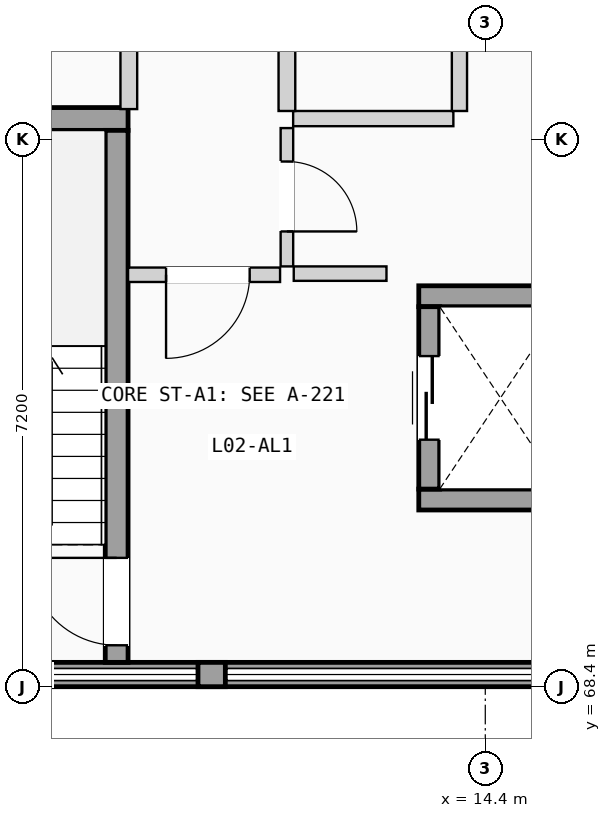
"""IFC4 building model, lengths in metres.
Left out: names, types, materials, properties, quantities, classifications, styles, units other than length and angle.
Written with IfcOpenShell. Run it as: python <this file> out.ifc"""

import sys

from ifc_helpers import new_model, si_unit, direction, frame, frame_2d, origin, place, context, subcontext, project, spatial, rectangle, extrude, element, fill, save


model = new_model("IFC4")
c1 = context("Model", 3, precision=1e-05, world=origin(), true_north=direction((0.0, 1.0)))
c2 = subcontext(c1, "Body", "Model", "MODEL_VIEW")
j1 = project(units=[si_unit("LENGTHUNIT", "METRE"), si_unit("PLANEANGLEUNIT", "RADIAN")], contexts=[c1])
p1 = place(None, origin())
s1 = spatial("IfcSite", under=j1, at=p1, CompositionType="ELEMENT")
p2 = place(p1, origin())
s2 = spatial("IfcBuilding", under=s1, at=p2, CompositionType="ELEMENT")
p3 = place(p2, frame((0.0, 0.0, 8.575)))
s3 = spatial("IfcBuildingStorey", under=s2, at=p3, CompositionType="ELEMENT", Elevation=8.575)
p4 = place(p3, frame((0.0, 68.56, 0.0), z_axis=(0.0, 0.0, 1.0), x_axis=(1.0, 0.0, 0.0)))
e1 = element("IfcWall", 1, at=p4, inside=s3, PredefinedType="SOLIDWALL", context=c2, shape_type="SweptSolid", body=[
    extrude(rectangle(XDim=21.6, YDim=0.32, at=frame_2d((10.8, 0.0))), origin(), (0.0, 0.0, 1.0), 1.11),
])
p5 = place(p3, frame((10.62, 68.56, 1.11), z_axis=(0.0, 0.0, 1.0), x_axis=(1.0, 0.0, 0.0)))
e2 = element("IfcWall", 2, at=p5, inside=s3, PredefinedType="SOLIDWALL", context=c2, shape_type="SweptSolid", body=[
    extrude(rectangle(XDim=0.36, YDim=0.32, at=frame_2d((0.18, 0.0))), origin(), (0.0, 0.0, 1.0), 2.13),
])
p6 = place(p3, frame((5.75, 75.87, 0.0), z_axis=(0.0, 0.0, 1.0), x_axis=(1.0, 0.0, 0.0)))
e3 = element("IfcWall", 3, at=p6, inside=s3, PredefinedType="SHEAR", context=c2, shape_type="SweptSolid", body=[
    extrude(rectangle(XDim=3.95, YDim=0.3, at=frame_2d((1.975, 0.0))), origin(), (0.0, 0.0, 1.0), 3.24),
])
p7 = place(p3, frame((9.55, 68.72, 0.0), z_axis=(0.0, 0.0, 1.0), x_axis=(0.0, 1.0, 0.0)))
e4 = element("IfcWall", 4, at=p7, inside=s3, PredefinedType="SHEAR", context=c2, shape_type="SweptSolid", body=[
    extrude(rectangle(XDim=7.0, YDim=0.3, at=frame_2d((3.5, 0.0))), origin(), (0.0, 0.0, 1.0), 3.24),
])
p8 = place(p7, frame((0.225, 0.0, 0.0)))
e5 = element("IfcOpeningElement", 5, at=p8, cuts=e4, PredefinedType="OPENING", context=c2, shape_type="SweptSolid", body=[
    extrude(rectangle(XDim=1.15, YDim=2.12, at=frame_2d((0.575, 1.06))), frame((0.0, 0.16, 0.0), z_axis=(0.0, -1.0, 0.0), x_axis=(1.0, 0.0, 0.0)), (0.0, 0.0, 1.0), 0.32),
])
for number, where, z_axis, x_axis in (
    (6, (13.525, 70.863, 0.0), (0.0, 0.0, 1.0), (1.0, 0.0, 0.0)),
    (7, (13.525, 73.538, 0.0), (0.0, 0.0, 1.0), (1.0, 0.0, 0.0)),
):
    element("IfcWall", number, at=place(p3, frame(where, z_axis=z_axis, x_axis=x_axis)), inside=s3, PredefinedType="SHEAR", context=c2, shape_type="SweptSolid", body=[
        extrude(rectangle(XDim=2.15, YDim=0.275, at=frame_2d((1.075, 0.0))), origin(), (0.0, 0.0, 1.0), 3.24),
    ])
p9 = place(p3, frame((13.663, 71.0, 0.0), z_axis=(0.0, 0.0, 1.0), x_axis=(0.0, 1.0, 0.0)))
e8 = element("IfcWall", 8, at=p9, inside=s3, PredefinedType="SHEAR", context=c2, shape_type="SweptSolid", body=[
    extrude(rectangle(XDim=2.4, YDim=0.275, at=frame_2d((1.2, 0.0))), origin(), (0.0, 0.0, 1.0), 3.24),
])
p10 = place(p9, frame((0.65, 0.0, 0.0)))
e9 = element("IfcOpeningElement", 9, at=p10, cuts=e8, PredefinedType="OPENING", context=c2, shape_type="SweptSolid", body=[
    extrude(rectangle(XDim=1.1, YDim=2.15, at=frame_2d((0.55, 1.075))), frame((0.0, 0.147, 0.0), z_axis=(0.0, -1.0, 0.0), x_axis=(1.0, 0.0, 0.0)), (0.0, 0.0, 1.0), 0.295),
])
p11 = place(p3, frame((11.88, 73.835, 0.0), z_axis=(0.0, 0.0, 1.0), x_axis=(1.0, 0.0, 0.0)))
e10 = element("IfcWall", 10, at=p11, inside=s3, PredefinedType="PARTITIONING", context=c2, shape_type="SweptSolid", body=[
    extrude(rectangle(XDim=1.22, YDim=0.19, at=frame_2d((0.61, 0.0))), origin(), (0.0, 0.0, 1.0), 3.22),
])
p12 = place(p3, frame((9.7, 73.82, 0.0), z_axis=(0.0, 0.0, 1.0), x_axis=(1.0, 0.0, 0.0)))
e11 = element("IfcWall", 11, at=p12, inside=s3, PredefinedType="PARTITIONING", context=c2, shape_type="SweptSolid", body=[
    extrude(rectangle(XDim=2.0, YDim=0.19, at=frame_2d((1.0, 0.0))), origin(), (0.0, 0.0, 1.0), 3.22),
])
p13 = place(p12, frame((0.5, 0.0, 0.0)))
e12 = element("IfcOpeningElement", 12, at=p13, cuts=e11, PredefinedType="OPENING", context=c2, shape_type="SweptSolid", body=[
    extrude(rectangle(XDim=1.1, YDim=2.12, at=frame_2d((0.55, 1.06))), frame((0.0, 0.105, 0.0), z_axis=(0.0, -1.0, 0.0), x_axis=(1.0, 0.0, 0.0)), (0.0, 0.0, 1.0), 0.21),
])
p14 = place(p3, frame((11.79, 73.93, 0.0), z_axis=(0.0, 0.0, 1.0), x_axis=(0.0, 1.0, 0.0)))
e13 = element("IfcWall", 13, at=p14, inside=s3, PredefinedType="PARTITIONING", context=c2, shape_type="SweptSolid", body=[
    extrude(rectangle(XDim=1.82, YDim=0.165, at=frame_2d((0.91, 0.0))), origin(), (0.0, 0.0, 1.0), 3.22),
])
p15 = place(p14, frame((0.46, 0.0, 0.0)))
e14 = element("IfcOpeningElement", 14, at=p15, cuts=e13, PredefinedType="OPENING", context=c2, shape_type="SweptSolid", body=[
    extrude(rectangle(XDim=0.92, YDim=2.04, at=frame_2d((0.46, 1.02))), frame((0.0, 0.093, 0.0), z_axis=(0.0, -1.0, 0.0), x_axis=(1.0, 0.0, 0.0)), (0.0, 0.0, 1.0), 0.185),
])
p16 = place(p3, frame((11.872, 75.875, 0.0), z_axis=(0.0, 0.0, 1.0), x_axis=(1.0, 0.0, 0.0)))
e15 = element("IfcWall", 15, at=p16, inside=s3, PredefinedType="PLUMBINGWALL", context=c2, shape_type="SweptSolid", body=[
    extrude(rectangle(XDim=2.108, YDim=0.2, at=frame_2d((1.054, 0.0))), origin(), (0.0, 0.0, 1.0), 3.22),
])
p17 = place(p3, frame((9.71, 76.0, 0.0), z_axis=(0.0, 0.0, 1.0), x_axis=(0.0, 1.0, 0.0)))
e16 = element("IfcWall", 16, at=p17, inside=s3, PredefinedType="PLUMBINGWALL", context=c2, shape_type="SweptSolid", body=[
    extrude(rectangle(XDim=4.912, YDim=0.22, at=frame_2d((2.456, 0.0))), origin(), (0.0, 0.0, 1.0), 3.22),
])
p18 = place(p3, frame((11.79, 75.975, 0.0), z_axis=(0.0, 0.0, 1.0), x_axis=(0.0, 1.0, 0.0)))
e17 = element("IfcWall", 17, at=p18, inside=s3, PredefinedType="PLUMBINGWALL", context=c2, shape_type="SweptSolid", body=[
    extrude(rectangle(XDim=4.937, YDim=0.22, at=frame_2d((2.469, 0.0))), origin(), (0.0, 0.0, 1.0), 3.22),
])
p19 = place(p3, frame((14.06, 75.975, 0.0), z_axis=(0.0, 0.0, 1.0), x_axis=(0.0, 1.0, 0.0)))
e18 = element("IfcWall", 18, at=p19, inside=s3, PredefinedType="PLUMBINGWALL", context=c2, shape_type="SweptSolid", body=[
    extrude(rectangle(XDim=4.937, YDim=0.2, at=frame_2d((2.469, 0.0))), origin(), (0.0, 0.0, 1.0), 3.22),
])
p20 = place(p8, origin())
e19 = element("IfcDoor", 19, at=p20, inside=s3, OperationType="SINGLE_SWING_RIGHT", PredefinedType="DOOR", context=c2, shape_type="SweptSolid", body=[
    extrude(rectangle(XDim=1.15, YDim=2.12, at=frame_2d((0.575, 1.06))), frame((0.0, 0.025, 0.0), z_axis=(0.0, -1.0, 0.0), x_axis=(1.0, 0.0, 0.0)), (0.0, 0.0, 1.0), 0.05),
])
fill(e5, e19)
p21 = place(p10, origin())
e20 = element("IfcDoor", 20, at=p21, inside=s3, OperationType="SLIDING_TO_LEFT", PredefinedType="DOOR", context=c2, shape_type="SweptSolid", body=[
    extrude(rectangle(XDim=1.1, YDim=2.15, at=frame_2d((0.55, 1.075))), frame((0.0, 0.025, 0.0), z_axis=(0.0, -1.0, 0.0), x_axis=(1.0, 0.0, 0.0)), (0.0, 0.0, 1.0), 0.05),
])
fill(e9, e20)
p22 = place(p13, frame((1.1, 0.0, 0.0), z_axis=(0.0, 0.0, 1.0), x_axis=(-1.0, 0.0, 0.0)))
e21 = element("IfcDoor", 21, at=p22, inside=s3, OperationType="SINGLE_SWING_LEFT", PredefinedType="DOOR", context=c2, shape_type="SweptSolid", body=[
    extrude(rectangle(XDim=1.1, YDim=2.12, at=frame_2d((0.55, 1.06))), frame((0.0, 0.025, 0.0), z_axis=(0.0, -1.0, 0.0), x_axis=(1.0, 0.0, 0.0)), (0.0, 0.0, 1.0), 0.05),
])
fill(e12, e21)
p23 = place(p15, frame((0.92, 0.0, 0.0), z_axis=(0.0, 0.0, 1.0), x_axis=(-1.0, 0.0, 0.0)))
e22 = element("IfcDoor", 22, at=p23, inside=s3, OperationType="SINGLE_SWING_LEFT", PredefinedType="DOOR", context=c2, shape_type="SweptSolid", body=[
    extrude(rectangle(XDim=0.92, YDim=2.04, at=frame_2d((0.46, 1.02))), frame((0.0, 0.025, 0.0), z_axis=(0.0, -1.0, 0.0), x_axis=(1.0, 0.0, 0.0)), (0.0, 0.0, 1.0), 0.05),
])
fill(e14, e22)
save(model, sys.argv[1])
